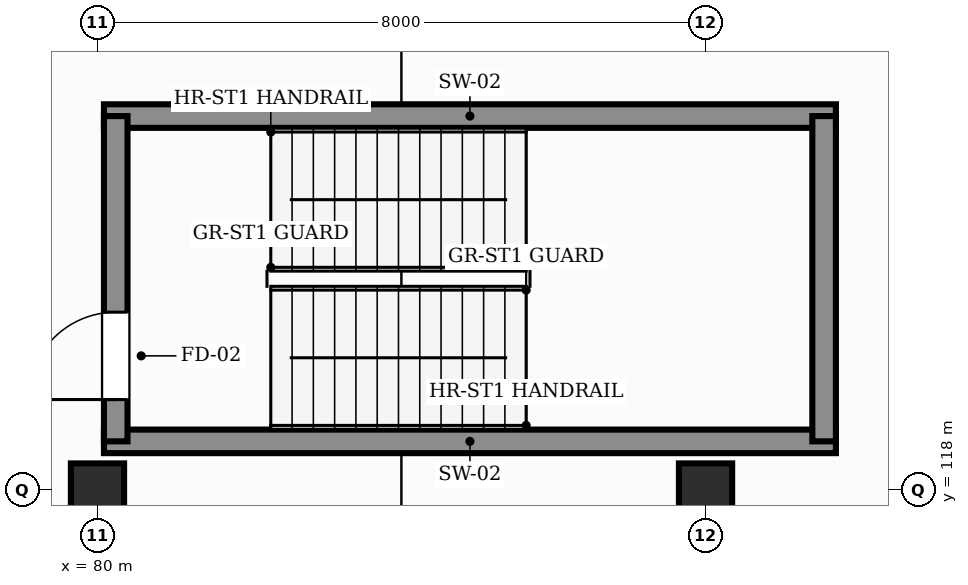
"""IFC4 building model, lengths in metres.
Left out: names, types, materials, properties, quantities, classifications, styles, units other than length and angle.
Written with IfcOpenShell. Run it as: python <this file> out.ifc"""

import sys

from ifc_helpers import new_model, si_unit, direction, frame, frame_2d, origin, origin_2d, place, context, subcontext, project, spatial, rectangle, extrude, element, fill, save


model = new_model("IFC4")
c1 = context("Model", 3, precision=1e-05, world=origin(), true_north=direction((0.0, 1.0)))
c2 = subcontext(c1, "Body", "Model", "MODEL_VIEW")
j1 = project(units=[si_unit("LENGTHUNIT", "METRE"), si_unit("PLANEANGLEUNIT", "RADIAN")], contexts=[c1])
p1 = place(None, origin())
s1 = spatial("IfcSite", under=j1, at=p1, CompositionType="ELEMENT")
p2 = place(p1, origin())
s2 = spatial("IfcBuilding", under=s1, at=p2, CompositionType="ELEMENT")
p3 = place(p2, frame((0.0, 0.0, -4.8)))
s3 = spatial("IfcBuildingStorey", under=s2, at=p3, CompositionType="ELEMENT", Elevation=-4.8)
for number, where, z_axis, x_axis in (
    (1, (80.0, 118.0, 0.0), (0.0, 0.0, 1.0), (1.0, 0.0, 0.0)),
    (2, (88.0, 118.0, 0.0), (0.0, 0.0, 1.0), (1.0, 0.0, 0.0)),
):
    element("IfcColumn", number, at=place(p3, frame(where, z_axis=z_axis, x_axis=x_axis)), inside=s3, PredefinedType="COLUMN", context=c2, shape_type="SweptSolid", body=[
        extrude(rectangle(XDim=0.7, YDim=0.7, at=origin_2d()), origin(), (0.0, 0.0, 1.0), 4.8),
    ])
for number, where, z_axis, x_axis in (
    (3, (80.085, 118.64, 0.0), (0.0, 0.0, 1.0), (1.0, 0.0, 0.0)),
    (4, (80.085, 122.92, 0.0), (0.0, 0.0, 1.0), (1.0, 0.0, 0.0)),
):
    element("IfcWall", number, at=place(p3, frame(where, z_axis=z_axis, x_axis=x_axis)), inside=s3, PredefinedType="SHEAR", context=c2, shape_type="SweptSolid", body=[
        extrude(rectangle(XDim=9.63, YDim=0.31, at=frame_2d((4.815, 0.0))), origin(), (0.0, 0.0, 1.0), 4.8),
    ])
p4 = place(p3, frame((80.24, 118.64, 0.0), z_axis=(0.0, 0.0, 1.0), x_axis=(0.0, 1.0, 0.0)))
e5 = element("IfcWall", 5, at=p4, inside=s3, PredefinedType="SHEAR", context=c2, shape_type="SweptSolid", body=[
    extrude(rectangle(XDim=4.28, YDim=0.31, at=frame_2d((2.14, 0.0))), origin(), (0.0, 0.0, 1.0), 4.8),
])
p5 = place(p4, frame((0.55, 0.0, 0.0)))
e6 = element("IfcOpeningElement", 6, at=p5, cuts=e5, PredefinedType="OPENING", context=c2, shape_type="SweptSolid", body=[
    extrude(rectangle(XDim=1.15, YDim=2.2, at=frame_2d((0.575, 1.1))), frame((0.0, 0.165, 0.0), z_axis=(0.0, -1.0, 0.0), x_axis=(1.0, 0.0, 0.0)), (0.0, 0.0, 1.0), 0.33),
])
p6 = place(p3, frame((89.56, 118.64, 0.0), z_axis=(0.0, 0.0, 1.0), x_axis=(0.0, 1.0, 0.0)))
e7 = element("IfcWall", 7, at=p6, inside=s3, PredefinedType="SHEAR", context=c2, shape_type="SweptSolid", body=[
    extrude(rectangle(XDim=4.28, YDim=0.31, at=frame_2d((2.14, 0.0))), origin(), (0.0, 0.0, 1.0), 4.8),
])
p7 = place(p5, origin())
e8 = element("IfcDoor", 8, at=p7, inside=s3, OperationType="SINGLE_SWING_LEFT", PredefinedType="DOOR", context=c2, shape_type="SweptSolid", body=[
    extrude(rectangle(XDim=1.15, YDim=2.2, at=frame_2d((0.575, 1.1))), frame((0.0, 0.025, 0.0), z_axis=(0.0, -1.0, 0.0), x_axis=(1.0, 0.0, 0.0)), (0.0, 0.0, 1.0), 0.05),
])
fill(e6, e8)
save(model, sys.argv[1])
